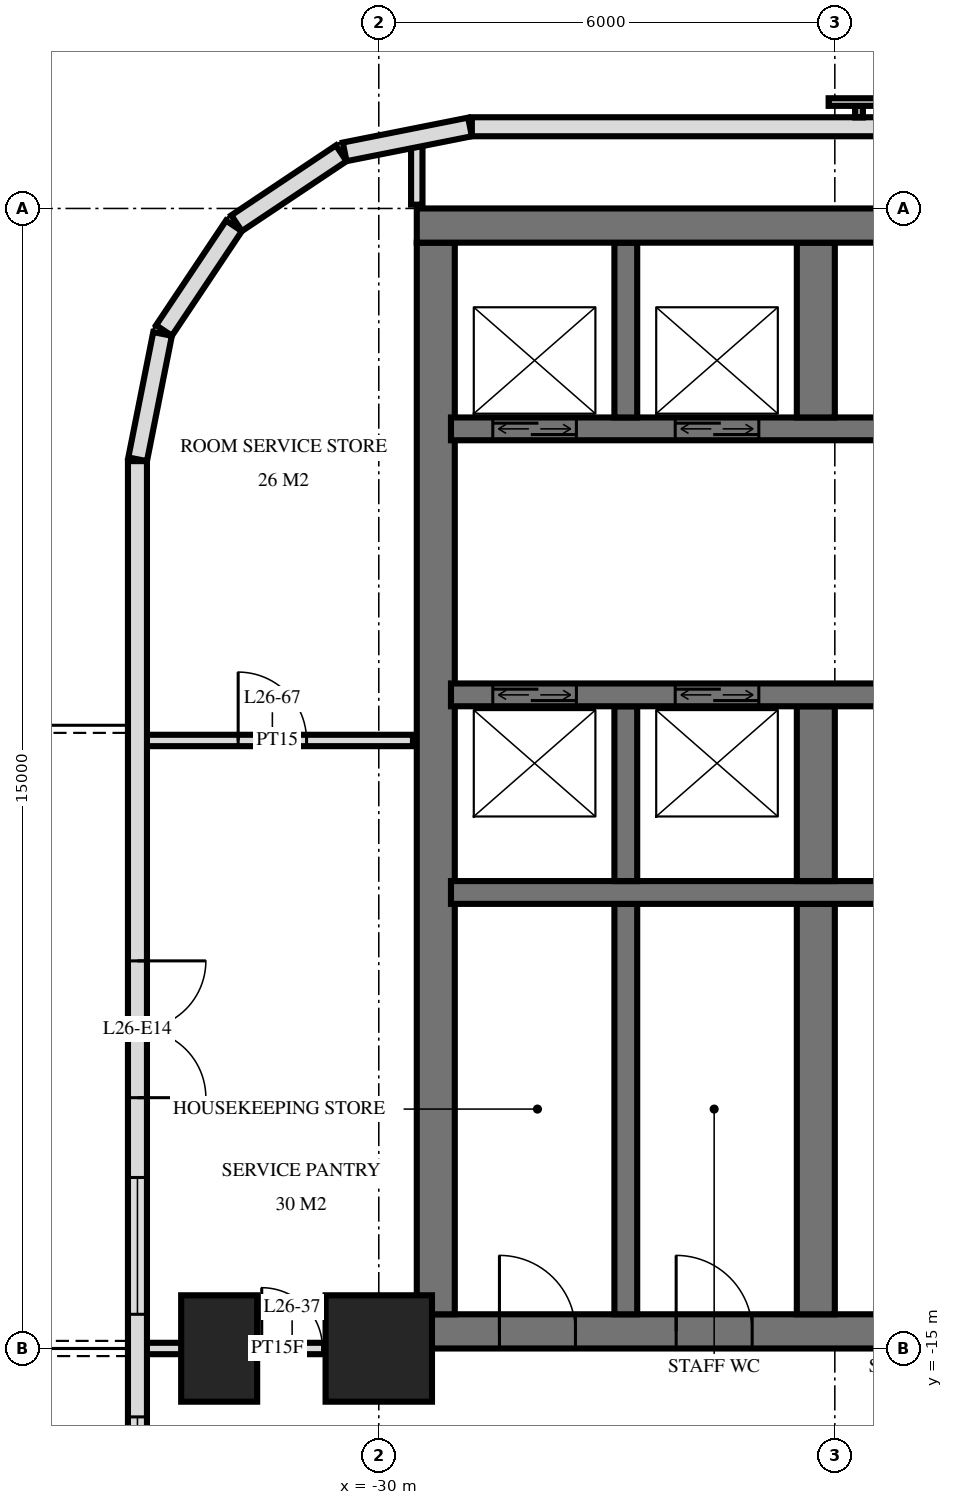
"""IFC4 building model, lengths in metres.
Left out: names, types, materials, properties, quantities, classifications, styles, units other than length and angle.
Written with IfcOpenShell. Run it as: python <this file> out.ifc"""

import sys

from ifc_helpers import new_model, si_unit, direction, frame, frame_2d, origin, origin_2d, place, context, subcontext, project, spatial, rectangle, extrude, element, fill, save


model = new_model("IFC4")
c1 = context("Model", 3, precision=1e-05, world=origin(), true_north=direction((0.0, 1.0)))
c2 = subcontext(c1, "Body", "Model", "MODEL_VIEW")
j1 = project(units=[si_unit("LENGTHUNIT", "METRE"), si_unit("PLANEANGLEUNIT", "RADIAN")], contexts=[c1])
p1 = place(None, origin())
s1 = spatial("IfcSite", under=j1, at=p1, CompositionType="ELEMENT")
p2 = place(p1, origin())
s2 = spatial("IfcBuilding", under=s1, at=p2, CompositionType="ELEMENT")
p3 = place(p2, frame((0.0, 0.0, 103.2)))
s3 = spatial("IfcBuildingStorey", under=s2, at=p3, CompositionType="ELEMENT", Elevation=103.2)
p4 = place(p3, frame((-32.1, -15.0, 0.0), z_axis=(0.0, 0.0, 1.0), x_axis=(0.0, 1.0, 0.0)))
e1 = element("IfcColumn", 1, at=p4, inside=s3, PredefinedType="COLUMN", context=c2, shape_type="SweptSolid", body=[
    extrude(rectangle(XDim=1.4, YDim=1.0, at=origin_2d()), origin(), (0.0, 0.0, 1.0), 3.6),
])
p5 = place(p3, frame((-30.0, -15.0, 0.0), z_axis=(0.0, 0.0, 1.0), x_axis=(1.0, 0.0, 0.0)))
e2 = element("IfcColumn", 2, at=p5, inside=s3, PredefinedType="COLUMN", context=c2, shape_type="SweptSolid", body=[
    extrude(rectangle(XDim=1.4, YDim=1.4, at=origin_2d()), origin(), (0.0, 0.0, 1.0), 3.6),
])
p6 = place(p3, frame((-29.5, -0.225, 0.0), z_axis=(0.0, 0.0, 1.0), x_axis=(1.0, 0.0, 0.0)))
e3 = element("IfcWall", 3, at=p6, inside=s3, PredefinedType="SHEAR", context=c2, shape_type="SweptSolid", body=[
    extrude(rectangle(XDim=19.5, YDim=0.45, at=frame_2d((9.75, 0.0))), origin(), (0.0, 0.0, 1.0), 3.6),
])
p7 = place(p3, frame((-29.5, -14.775, 0.0), z_axis=(0.0, 0.0, 1.0), x_axis=(1.0, 0.0, 0.0)))
e4 = element("IfcWall", 4, at=p7, inside=s3, PredefinedType="SHEAR", context=c2, shape_type="SweptSolid", body=[
    extrude(rectangle(XDim=19.5, YDim=0.45, at=frame_2d((9.75, 0.0))), origin(), (0.0, 0.0, 1.0), 3.6),
])
p8 = place(p7, frame((11.2, 0.0, 0.0)))
e5 = element("IfcOpeningElement", 5, at=p8, cuts=e4, PredefinedType="OPENING", context=c2, shape_type="SweptSolid", body=[
    extrude(rectangle(XDim=1.2, YDim=2.1, at=frame_2d((0.6, 1.05))), frame((0.0, 0.235, 0.0), z_axis=(0.0, -1.0, 0.0), x_axis=(1.0, 0.0, 0.0)), (0.0, 0.0, 1.0), 0.47),
])
p9 = place(p7, frame((14.25, 0.0, 0.0)))
e6 = element("IfcOpeningElement", 6, at=p9, cuts=e4, PredefinedType="OPENING", context=c2, shape_type="SweptSolid", body=[
    extrude(rectangle(XDim=1.1, YDim=2.1, at=frame_2d((0.55, 1.05))), frame((0.0, 0.235, 0.0), z_axis=(0.0, -1.0, 0.0), x_axis=(1.0, 0.0, 0.0)), (0.0, 0.0, 1.0), 0.47),
])
p10 = place(p7, frame((8.5, 0.0, 0.0)))
e7 = element("IfcOpeningElement", 7, at=p10, cuts=e4, PredefinedType="OPENING", context=c2, shape_type="SweptSolid", body=[
    extrude(rectangle(XDim=0.9, YDim=2.1, at=frame_2d((0.45, 1.05))), frame((0.0, 0.235, 0.0), z_axis=(0.0, -1.0, 0.0), x_axis=(1.0, 0.0, 0.0)), (0.0, 0.0, 1.0), 0.47),
])
p11 = place(p7, frame((6.05, 0.0, 0.0)))
e8 = element("IfcOpeningElement", 8, at=p11, cuts=e4, PredefinedType="OPENING", context=c2, shape_type="SweptSolid", body=[
    extrude(rectangle(XDim=1.0, YDim=2.1, at=frame_2d((0.5, 1.05))), frame((0.0, 0.235, 0.0), z_axis=(0.0, -1.0, 0.0), x_axis=(1.0, 0.0, 0.0)), (0.0, 0.0, 1.0), 0.47),
])
p12 = place(p7, frame((3.413, 0.0, 0.0)))
e9 = element("IfcOpeningElement", 9, at=p12, cuts=e4, PredefinedType="OPENING", context=c2, shape_type="SweptSolid", body=[
    extrude(rectangle(XDim=1.0, YDim=2.1, at=frame_2d((0.5, 1.05))), frame((0.0, 0.235, 0.0), z_axis=(0.0, -1.0, 0.0), x_axis=(1.0, 0.0, 0.0)), (0.0, 0.0, 1.0), 0.47),
])
p13 = place(p7, frame((1.087, 0.0, 0.0)))
e10 = element("IfcOpeningElement", 10, at=p13, cuts=e4, PredefinedType="OPENING", context=c2, shape_type="SweptSolid", body=[
    extrude(rectangle(XDim=1.0, YDim=2.1, at=frame_2d((0.5, 1.05))), frame((0.0, 0.235, 0.0), z_axis=(0.0, -1.0, 0.0), x_axis=(1.0, 0.0, 0.0)), (0.0, 0.0, 1.0), 0.47),
])
p14 = place(p3, frame((-29.25, -14.55, 0.0), z_axis=(0.0, 0.0, 1.0), x_axis=(0.0, 1.0, 0.0)))
e11 = element("IfcWall", 11, at=p14, inside=s3, PredefinedType="SHEAR", context=c2, shape_type="SweptSolid", body=[
    extrude(rectangle(XDim=14.1, YDim=0.5, at=frame_2d((7.05, 0.0))), origin(), (0.0, 0.0, 1.0), 3.6),
])
p15 = place(p3, frame((-29.05, -2.9, 0.0), z_axis=(0.0, 0.0, 1.0), x_axis=(1.0, 0.0, 0.0)))
e12 = element("IfcWall", 12, at=p15, inside=s3, PredefinedType="SHEAR", context=c2, shape_type="SweptSolid", body=[
    extrude(rectangle(XDim=18.7, YDim=0.3, at=frame_2d((9.35, 0.0))), origin(), (0.0, 0.0, 1.0), 3.6),
])
p16 = place(p15, frame((2.95, 0.0, 0.0)))
e13 = element("IfcOpeningElement", 13, at=p16, cuts=e12, PredefinedType="OPENING", context=c2, shape_type="SweptSolid", body=[
    extrude(rectangle(XDim=1.1, YDim=2.1, at=frame_2d((0.55, 1.05))), frame((0.0, 0.16, 0.0), z_axis=(0.0, -1.0, 0.0), x_axis=(1.0, 0.0, 0.0)), (0.0, 0.0, 1.0), 0.32),
])
p17 = place(p15, frame((0.55, 0.0, 0.0)))
e14 = element("IfcOpeningElement", 14, at=p17, cuts=e12, PredefinedType="OPENING", context=c2, shape_type="SweptSolid", body=[
    extrude(rectangle(XDim=1.1, YDim=2.1, at=frame_2d((0.55, 1.05))), frame((0.0, 0.16, 0.0), z_axis=(0.0, -1.0, 0.0), x_axis=(1.0, 0.0, 0.0)), (0.0, 0.0, 1.0), 0.32),
])
p18 = place(p15, frame((10.9, 0.0, 0.0)))
e15 = element("IfcOpeningElement", 15, at=p18, cuts=e12, PredefinedType="OPENING", context=c2, shape_type="SweptSolid", body=[
    extrude(rectangle(XDim=0.9, YDim=2.1, at=frame_2d((0.45, 1.05))), frame((0.0, 0.16, 0.0), z_axis=(0.0, -1.0, 0.0), x_axis=(1.0, 0.0, 0.0)), (0.0, 0.0, 1.0), 0.32),
])
p19 = place(p15, frame((16.85, 0.0, 0.0)))
e16 = element("IfcOpeningElement", 16, at=p19, cuts=e12, PredefinedType="OPENING", context=c2, shape_type="SweptSolid", body=[
    extrude(rectangle(XDim=1.0, YDim=2.1, at=frame_2d((0.5, 1.05))), frame((0.0, 0.16, 0.0), z_axis=(0.0, -1.0, 0.0), x_axis=(1.0, 0.0, 0.0)), (0.0, 0.0, 1.0), 0.32),
])
p20 = place(p15, frame((13.85, 0.0, 0.0)))
e17 = element("IfcOpeningElement", 17, at=p20, cuts=e12, PredefinedType="OPENING", context=c2, shape_type="SweptSolid", body=[
    extrude(rectangle(XDim=1.0, YDim=2.1, at=frame_2d((0.5, 1.05))), frame((0.0, 0.16, 0.0), z_axis=(0.0, -1.0, 0.0), x_axis=(1.0, 0.0, 0.0)), (0.0, 0.0, 1.0), 0.32),
])
p21 = place(p3, frame((-29.05, -6.4, 0.0), z_axis=(0.0, 0.0, 1.0), x_axis=(1.0, 0.0, 0.0)))
e18 = element("IfcWall", 18, at=p21, inside=s3, PredefinedType="SHEAR", context=c2, shape_type="SweptSolid", body=[
    extrude(rectangle(XDim=18.7, YDim=0.3, at=frame_2d((9.35, 0.0))), origin(), (0.0, 0.0, 1.0), 3.6),
])
p22 = place(p21, frame((2.95, 0.0, 0.0)))
e19 = element("IfcOpeningElement", 19, at=p22, cuts=e18, PredefinedType="OPENING", context=c2, shape_type="SweptSolid", body=[
    extrude(rectangle(XDim=1.1, YDim=2.1, at=frame_2d((0.55, 1.05))), frame((0.0, 0.16, 0.0), z_axis=(0.0, -1.0, 0.0), x_axis=(1.0, 0.0, 0.0)), (0.0, 0.0, 1.0), 0.32),
])
p23 = place(p21, frame((0.55, 0.0, 0.0)))
e20 = element("IfcOpeningElement", 20, at=p23, cuts=e18, PredefinedType="OPENING", context=c2, shape_type="SweptSolid", body=[
    extrude(rectangle(XDim=1.1, YDim=2.1, at=frame_2d((0.55, 1.05))), frame((0.0, 0.16, 0.0), z_axis=(0.0, -1.0, 0.0), x_axis=(1.0, 0.0, 0.0)), (0.0, 0.0, 1.0), 0.32),
])
p24 = place(p21, frame((10.8, 0.0, 0.0)))
e21 = element("IfcOpeningElement", 21, at=p24, cuts=e18, PredefinedType="OPENING", context=c2, shape_type="SweptSolid", body=[
    extrude(rectangle(XDim=1.1, YDim=2.1, at=frame_2d((0.55, 1.05))), frame((0.0, 0.16, 0.0), z_axis=(0.0, -1.0, 0.0), x_axis=(1.0, 0.0, 0.0)), (0.0, 0.0, 1.0), 0.32),
])
p25 = place(p3, frame((-29.05, -9.0, 0.0), z_axis=(0.0, 0.0, 1.0), x_axis=(1.0, 0.0, 0.0)))
e22 = element("IfcWall", 22, at=p25, inside=s3, PredefinedType="SHEAR", context=c2, shape_type="SweptSolid", body=[
    extrude(rectangle(XDim=18.7, YDim=0.3, at=frame_2d((9.35, 0.0))), origin(), (0.0, 0.0, 1.0), 3.6),
])
p26 = place(p25, frame((13.8, 0.0, 0.0)))
e23 = element("IfcOpeningElement", 23, at=p26, cuts=e22, PredefinedType="OPENING", context=c2, shape_type="SweptSolid", body=[
    extrude(rectangle(XDim=1.1, YDim=2.1, at=frame_2d((0.55, 1.05))), frame((0.0, 0.16, 0.0), z_axis=(0.0, -1.0, 0.0), x_axis=(1.0, 0.0, 0.0)), (0.0, 0.0, 1.0), 0.32),
])
for number, where, z_axis, x_axis in (
    (24, (-24.25, -2.75, 0.0), (0.0, 0.0, 1.0), (0.0, 1.0, 0.0)),
    (25, (-24.25, -8.85, 0.0), (0.0, 0.0, 1.0), (0.0, 1.0, 0.0)),
):
    element("IfcWall", number, at=place(p3, frame(where, z_axis=z_axis, x_axis=x_axis)), inside=s3, PredefinedType="SHEAR", context=c2, shape_type="SweptSolid", body=[
        extrude(rectangle(XDim=2.3, YDim=0.5, at=frame_2d((1.15, 0.0))), origin(), (0.0, 0.0, 1.0), 3.6),
    ])
p27 = place(p3, frame((-24.25, -14.55, 0.0), z_axis=(0.0, 0.0, 1.0), x_axis=(0.0, 1.0, 0.0)))
e26 = element("IfcWall", 26, at=p27, inside=s3, PredefinedType="SHEAR", context=c2, shape_type="SweptSolid", body=[
    extrude(rectangle(XDim=5.4, YDim=0.5, at=frame_2d((2.7, 0.0))), origin(), (0.0, 0.0, 1.0), 3.6),
])
for number, where, z_axis, x_axis in (
    (27, (-26.75, -2.75, 0.0), (0.0, 0.0, 1.0), (0.0, 1.0, 0.0)),
    (28, (-26.75, -8.85, 0.0), (0.0, 0.0, 1.0), (0.0, 1.0, 0.0)),
):
    element("IfcWall", number, at=place(p3, frame(where, z_axis=z_axis, x_axis=x_axis)), inside=s3, PredefinedType="SHEAR", context=c2, shape_type="SweptSolid", body=[
        extrude(rectangle(XDim=2.3, YDim=0.3, at=frame_2d((1.15, 0.0))), origin(), (0.0, 0.0, 1.0), 3.6),
    ])
p28 = place(p3, frame((-26.75, -14.55, 0.0), z_axis=(0.0, 0.0, 1.0), x_axis=(0.0, 1.0, 0.0)))
e29 = element("IfcWall", 29, at=p28, inside=s3, PredefinedType="SHEAR", context=c2, shape_type="SweptSolid", body=[
    extrude(rectangle(XDim=5.4, YDim=0.3, at=frame_2d((2.7, 0.0))), origin(), (0.0, 0.0, 1.0), 3.6),
])
p29 = place(p3, frame((28.775, 1.075, 0.0), z_axis=(0.0, 0.0, 1.0), x_axis=(-1.0, 0.0, 0.0)))
e30 = element("IfcWall", 30, at=p29, inside=s3, PredefinedType="SOLIDWALL", context=c2, shape_type="SweptSolid", body=[
    extrude(rectangle(XDim=57.551, YDim=0.25, at=frame_2d((28.775, 0.0))), origin(), (0.0, 0.0, 1.0), 3.3),
])
p30 = place(p29, frame((21.275, 0.0, 0.3)))
e31 = element("IfcOpeningElement", 31, at=p30, cuts=e30, PredefinedType="OPENING", context=c2, shape_type="SweptSolid", body=[
    extrude(rectangle(XDim=2.4, YDim=2.1, at=frame_2d((1.2, 1.05))), frame((0.0, 0.135, 0.0), z_axis=(0.0, -1.0, 0.0), x_axis=(1.0, 0.0, 0.0)), (0.0, 0.0, 1.0), 0.27),
])
p31 = place(p3, frame((-28.8, 1.073, 0.0), z_axis=(0.0, 0.0, 1.0), x_axis=(-0.980803419081, -0.194999110559, 0.0)))
e32 = element("IfcWall", 32, at=p31, inside=s3, PredefinedType="SOLIDWALL", context=c2, shape_type="SweptSolid", body=[
    extrude(rectangle(XDim=1.681, YDim=0.25, at=frame_2d((0.841, 0.0))), origin(), (0.0, 0.0, 1.0), 3.3),
])
for number, where, z_axis, x_axis in (
    (33, (-30.494, 0.726, 0.0), (0.0, 0.0, 1.0), (-0.831, -0.556, 0.0)),
    (34, (-31.906, -0.229, 0.0), (0.0, 0.0, 1.0), (-0.556, -0.831, 0.0)),
):
    element("IfcWall", number, at=place(p3, frame(where, z_axis=z_axis, x_axis=x_axis)), inside=s3, PredefinedType="SOLIDWALL", context=c2, shape_type="SweptSolid", body=[
        extrude(rectangle(XDim=1.656, YDim=0.25, at=frame_2d((0.828, 0.0))), origin(), (0.0, 0.0, 1.0), 3.3),
    ])
p32 = place(p3, frame((-32.844, -1.651, 0.0), z_axis=(0.0, 0.0, 1.0), x_axis=(-0.19513878023, -0.980775640221, 0.0)))
e35 = element("IfcWall", 35, at=p32, inside=s3, PredefinedType="SOLIDWALL", context=c2, shape_type="SweptSolid", body=[
    extrude(rectangle(XDim=1.681, YDim=0.25, at=frame_2d((0.841, 0.0))), origin(), (0.0, 0.0, 1.0), 3.3),
])
p33 = place(p3, frame((-33.175, -3.325, 0.0), z_axis=(0.0, 0.0, 1.0), x_axis=(0.0, -1.0, 0.0)))
e36 = element("IfcWall", 36, at=p33, inside=s3, PredefinedType="SOLIDWALL", context=c2, shape_type="SweptSolid", body=[
    extrude(rectangle(XDim=21.551, YDim=0.25, at=frame_2d((10.775, 0.0))), origin(), (0.0, 0.0, 1.0), 3.3),
])
p34 = place(p33, frame((6.575, 0.0, 0.0)))
e37 = element("IfcOpeningElement", 37, at=p34, cuts=e36, PredefinedType="OPENING", context=c2, shape_type="SweptSolid", body=[
    extrude(rectangle(XDim=1.8, YDim=2.4, at=frame_2d((0.9, 1.2))), frame((0.0, 0.135, 0.0), z_axis=(0.0, -1.0, 0.0), x_axis=(1.0, 0.0, 0.0)), (0.0, 0.0, 1.0), 0.27),
])
p35 = place(p33, frame((9.425, 0.0, 0.3)))
e38 = element("IfcOpeningElement", 38, at=p35, cuts=e36, PredefinedType="OPENING", context=c2, shape_type="SweptSolid", body=[
    extrude(rectangle(XDim=1.8, YDim=2.1, at=frame_2d((0.9, 1.05))), frame((0.0, 0.135, 0.0), z_axis=(0.0, -1.0, 0.0), x_axis=(1.0, 0.0, 0.0)), (0.0, 0.0, 1.0), 0.27),
])
p36 = place(p33, frame((12.575, 0.0, 0.3)))
e39 = element("IfcOpeningElement", 39, at=p36, cuts=e36, PredefinedType="OPENING", context=c2, shape_type="SweptSolid", body=[
    extrude(rectangle(XDim=1.2, YDim=2.1, at=frame_2d((0.6, 1.05))), frame((0.0, 0.135, 0.0), z_axis=(0.0, -1.0, 0.0), x_axis=(1.0, 0.0, 0.0)), (0.0, 0.0, 1.0), 0.27),
])
p37 = place(p33, frame((15.575, 0.0, 0.0)))
e40 = element("IfcOpeningElement", 40, at=p37, cuts=e36, PredefinedType="OPENING", context=c2, shape_type="SweptSolid", body=[
    extrude(rectangle(XDim=1.8, YDim=2.4, at=frame_2d((0.9, 1.2))), frame((0.0, 0.135, 0.0), z_axis=(0.0, -1.0, 0.0), x_axis=(1.0, 0.0, 0.0)), (0.0, 0.0, 1.0), 0.27),
])
p38 = place(p33, frame((18.875, 0.0, 0.0)))
e41 = element("IfcOpeningElement", 41, at=p38, cuts=e36, PredefinedType="OPENING", context=c2, shape_type="SweptSolid", body=[
    extrude(rectangle(XDim=1.8, YDim=2.4, at=frame_2d((0.9, 1.2))), frame((0.0, 0.135, 0.0), z_axis=(0.0, -1.0, 0.0), x_axis=(1.0, 0.0, 0.0)), (0.0, 0.0, 1.0), 0.27),
])
p39 = place(p3, frame((-29.5, 0.05, 0.0), z_axis=(0.0, 0.0, 1.0), x_axis=(0.0, 1.0, 0.0)))
e42 = element("IfcWall", 42, at=p39, inside=s3, PredefinedType="PARTITIONING", context=c2, shape_type="SweptSolid", body=[
    extrude(rectangle(XDim=0.827, YDim=0.15, at=frame_2d((0.414, 0.0))), origin(), (0.0, 0.0, 1.0), 3.32),
])
p40 = place(p3, frame((-33.12, -15.0, 0.0), z_axis=(0.0, 0.0, 1.0), x_axis=(1.0, 0.0, 0.0)))
e43 = element("IfcWall", 43, at=p40, inside=s3, PredefinedType="PARTITIONING", context=c2, shape_type="SweptSolid", body=[
    extrude(rectangle(XDim=3.57, YDim=0.15, at=frame_2d((1.785, 0.0))), origin(), (0.0, 0.0, 1.0), 3.32),
])
p41 = place(p40, frame((1.58, 0.0, 0.0)))
e44 = element("IfcOpeningElement", 44, at=p41, cuts=e43, PredefinedType="OPENING", context=c2, shape_type="SweptSolid", body=[
    extrude(rectangle(XDim=0.8, YDim=2.1, at=frame_2d((0.4, 1.05))), frame((0.0, 0.085, 0.0), z_axis=(0.0, -1.0, 0.0), x_axis=(1.0, 0.0, 0.0)), (0.0, 0.0, 1.0), 0.17),
])
p42 = place(p3, frame((-33.12, -7.0, 0.0), z_axis=(0.0, 0.0, 1.0), x_axis=(1.0, 0.0, 0.0)))
e45 = element("IfcWall", 45, at=p42, inside=s3, PredefinedType="PARTITIONING", context=c2, shape_type="SweptSolid", body=[
    extrude(rectangle(XDim=3.57, YDim=0.15, at=frame_2d((1.785, 0.0))), origin(), (0.0, 0.0, 1.0), 3.32),
])
p43 = place(p42, frame((1.27, 0.0, 0.0)))
e46 = element("IfcOpeningElement", 46, at=p43, cuts=e45, PredefinedType="OPENING", context=c2, shape_type="SweptSolid", body=[
    extrude(rectangle(XDim=0.9, YDim=2.1, at=frame_2d((0.45, 1.05))), frame((0.0, 0.085, 0.0), z_axis=(0.0, -1.0, 0.0), x_axis=(1.0, 0.0, 0.0)), (0.0, 0.0, 1.0), 0.17),
])
p44 = place(p34, origin())
e47 = element("IfcDoor", 47, at=p44, inside=s3, OperationType="DOUBLE_DOOR_SINGLE_SWING", PredefinedType="DOOR", context=c2, shape_type="SweptSolid", body=[
    extrude(rectangle(XDim=1.8, YDim=2.4, at=frame_2d((0.9, 1.2))), frame((0.0, 0.025, 0.0), z_axis=(0.0, -1.0, 0.0), x_axis=(1.0, 0.0, 0.0)), (0.0, 0.0, 1.0), 0.05),
])
fill(e37, e47)
p45 = place(p35, origin())
e48 = element("IfcWindow", 48, at=p45, inside=s3, PartitioningType="SINGLE_PANEL", PredefinedType="WINDOW", context=c2, shape_type="SweptSolid", body=[
    extrude(rectangle(XDim=1.8, YDim=2.1, at=frame_2d((0.9, 1.05))), frame((0.0, 0.03, 0.0), z_axis=(0.0, -1.0, 0.0), x_axis=(1.0, 0.0, 0.0)), (0.0, 0.0, 1.0), 0.06),
])
fill(e38, e48)
p46 = place(p36, origin())
e49 = element("IfcWindow", 49, at=p46, inside=s3, PartitioningType="SINGLE_PANEL", PredefinedType="WINDOW", context=c2, shape_type="SweptSolid", body=[
    extrude(rectangle(XDim=1.2, YDim=2.1, at=frame_2d((0.6, 1.05))), frame((0.0, 0.03, 0.0), z_axis=(0.0, -1.0, 0.0), x_axis=(1.0, 0.0, 0.0)), (0.0, 0.0, 1.0), 0.06),
])
fill(e39, e49)
p47 = place(p16, origin())
e50 = element("IfcDoor", 50, at=p47, inside=s3, OperationType="DOUBLE_DOOR_SLIDING", PredefinedType="USERDEFINED", context=c2, shape_type="SweptSolid", body=[
    extrude(rectangle(XDim=1.1, YDim=2.1, at=frame_2d((0.55, 1.05))), frame((0.0, 0.025, 0.0), z_axis=(0.0, -1.0, 0.0), x_axis=(1.0, 0.0, 0.0)), (0.0, 0.0, 1.0), 0.05),
])
fill(e13, e50)
p48 = place(p17, origin())
e51 = element("IfcDoor", 51, at=p48, inside=s3, OperationType="DOUBLE_DOOR_SLIDING", PredefinedType="USERDEFINED", context=c2, shape_type="SweptSolid", body=[
    extrude(rectangle(XDim=1.1, YDim=2.1, at=frame_2d((0.55, 1.05))), frame((0.0, 0.025, 0.0), z_axis=(0.0, -1.0, 0.0), x_axis=(1.0, 0.0, 0.0)), (0.0, 0.0, 1.0), 0.05),
])
fill(e14, e51)
p49 = place(p22, origin())
e52 = element("IfcDoor", 52, at=p49, inside=s3, OperationType="DOUBLE_DOOR_SLIDING", PredefinedType="USERDEFINED", context=c2, shape_type="SweptSolid", body=[
    extrude(rectangle(XDim=1.1, YDim=2.1, at=frame_2d((0.55, 1.05))), frame((0.0, 0.025, 0.0), z_axis=(0.0, -1.0, 0.0), x_axis=(1.0, 0.0, 0.0)), (0.0, 0.0, 1.0), 0.05),
])
fill(e19, e52)
p50 = place(p23, origin())
e53 = element("IfcDoor", 53, at=p50, inside=s3, OperationType="DOUBLE_DOOR_SLIDING", PredefinedType="USERDEFINED", context=c2, shape_type="SweptSolid", body=[
    extrude(rectangle(XDim=1.1, YDim=2.1, at=frame_2d((0.55, 1.05))), frame((0.0, 0.025, 0.0), z_axis=(0.0, -1.0, 0.0), x_axis=(1.0, 0.0, 0.0)), (0.0, 0.0, 1.0), 0.05),
])
fill(e20, e53)
p51 = place(p12, origin())
e54 = element("IfcDoor", 54, at=p51, inside=s3, OperationType="SINGLE_SWING_RIGHT", PredefinedType="DOOR", context=c2, shape_type="SweptSolid", body=[
    extrude(rectangle(XDim=1.0, YDim=2.1, at=frame_2d((0.5, 1.05))), frame((0.0, 0.025, 0.0), z_axis=(0.0, -1.0, 0.0), x_axis=(1.0, 0.0, 0.0)), (0.0, 0.0, 1.0), 0.05),
])
fill(e9, e54)
p52 = place(p13, origin())
e55 = element("IfcDoor", 55, at=p52, inside=s3, OperationType="SINGLE_SWING_RIGHT", PredefinedType="DOOR", context=c2, shape_type="SweptSolid", body=[
    extrude(rectangle(XDim=1.0, YDim=2.1, at=frame_2d((0.5, 1.05))), frame((0.0, 0.025, 0.0), z_axis=(0.0, -1.0, 0.0), x_axis=(1.0, 0.0, 0.0)), (0.0, 0.0, 1.0), 0.05),
])
fill(e10, e55)
p53 = place(p41, origin())
e56 = element("IfcDoor", 56, at=p53, inside=s3, OperationType="SINGLE_SWING_RIGHT", PredefinedType="DOOR", context=c2, shape_type="SweptSolid", body=[
    extrude(rectangle(XDim=0.8, YDim=2.1, at=frame_2d((0.4, 1.05))), frame((0.0, 0.025, 0.0), z_axis=(0.0, -1.0, 0.0), x_axis=(1.0, 0.0, 0.0)), (0.0, 0.0, 1.0), 0.05),
])
fill(e44, e56)
p54 = place(p43, origin())
e57 = element("IfcDoor", 57, at=p54, inside=s3, OperationType="SINGLE_SWING_RIGHT", PredefinedType="DOOR", context=c2, shape_type="SweptSolid", body=[
    extrude(rectangle(XDim=0.9, YDim=2.1, at=frame_2d((0.45, 1.05))), frame((0.0, 0.025, 0.0), z_axis=(0.0, -1.0, 0.0), x_axis=(1.0, 0.0, 0.0)), (0.0, 0.0, 1.0), 0.05),
])
fill(e46, e57)
save(model, sys.argv[1])
